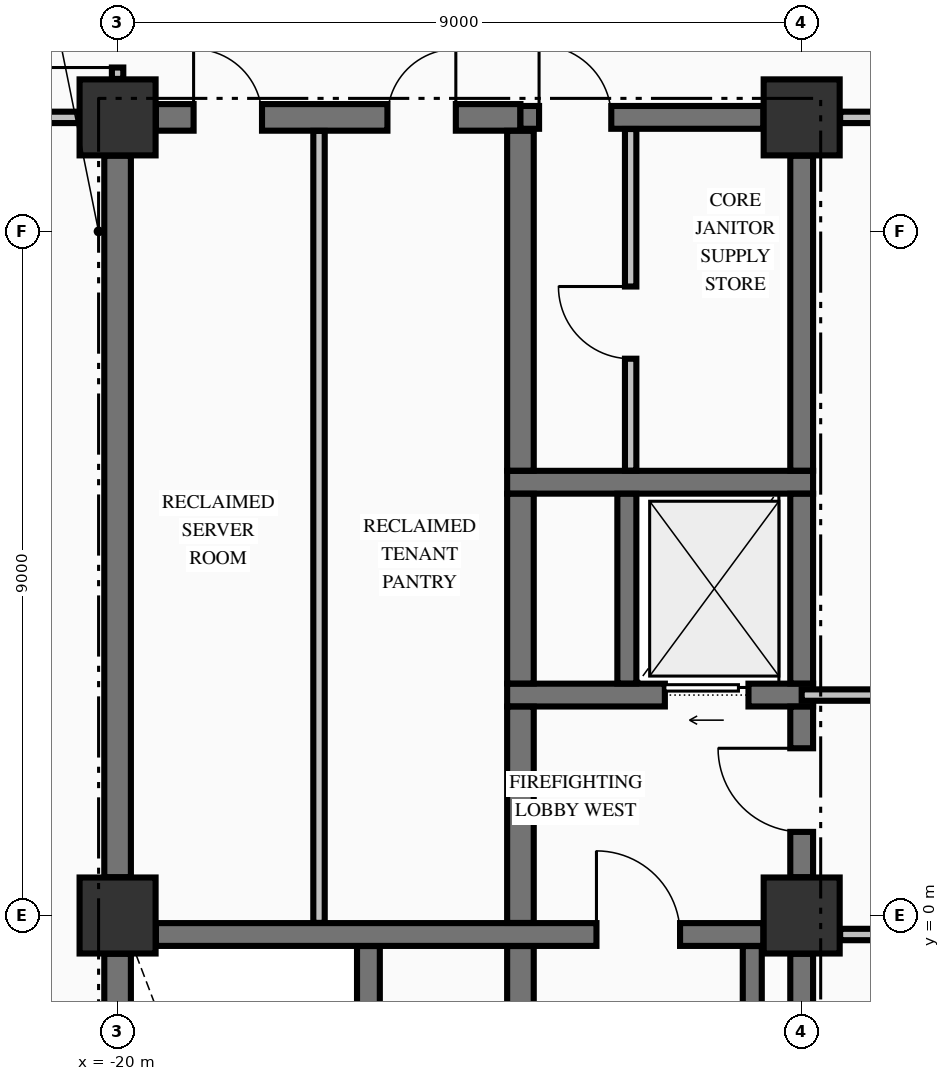
"""IFC4 building model, lengths in metres.
Left out: names, types, materials, properties, quantities, classifications, styles, units other than length and angle.
Written with IfcOpenShell. Run it as: python <this file> out.ifc"""

import sys

from ifc_helpers import new_model, si_unit, direction, frame, frame_2d, origin, origin_2d, place, context, subcontext, project, spatial, rectangle, extrude, element, fill, save


model = new_model("IFC4")
c1 = context("Model", 3, precision=1e-05, world=origin(), true_north=direction((0.0, 1.0)))
c2 = subcontext(c1, "Body", "Model", "MODEL_VIEW")
j1 = project(units=[si_unit("LENGTHUNIT", "METRE"), si_unit("PLANEANGLEUNIT", "RADIAN")], contexts=[c1])
p1 = place(None, origin())
s1 = spatial("IfcSite", under=j1, at=p1, CompositionType="ELEMENT")
p2 = place(p1, origin())
s2 = spatial("IfcBuilding", under=s1, at=p2, CompositionType="ELEMENT")
p3 = place(p2, frame((0.0, 0.0, 139.2)))
s3 = spatial("IfcBuildingStorey", under=s2, at=p3, CompositionType="ELEMENT", Elevation=139.2)
for number, where, z_axis, x_axis in (
    (1, (-20.0, 10.5, -0.25), (0.0, 0.0, 1.0), (1.0, 0.0, 0.0)),
    (2, (-11.0, 0.0, -0.25), (0.0, 0.0, 1.0), (1.0, 0.0, 0.0)),
    (3, (-11.0, 10.5, -0.25), (0.0, 0.0, 1.0), (1.0, 0.0, 0.0)),
    (4, (-20.0, 0.0, -0.25), (0.0, 0.0, 1.0), (1.0, 0.0, 0.0)),
):
    element("IfcColumn", number, at=place(p3, frame(where, z_axis=z_axis, x_axis=x_axis)), inside=s3, PredefinedType="COLUMN", context=c2, shape_type="SweptSolid", body=[
        extrude(rectangle(XDim=1.0, YDim=1.0, at=origin_2d()), origin(), (0.0, 0.0, 1.0), 3.495),
    ])
p4 = place(p3, frame((-19.496, -0.25, 0.0), z_axis=(0.0, 0.0, 1.0), x_axis=(1.0, 0.0, 0.0)))
e5 = element("IfcWall", 5, at=p4, inside=s3, PredefinedType="SHEAR", context=c2, shape_type="SweptSolid", body=[
    extrude(rectangle(XDim=7.992, YDim=0.3, at=frame_2d((3.996, 0.0))), origin(), (0.0, 0.0, 1.0), 3.245),
])
p5 = place(p4, frame((5.796, 0.0, 0.0)))
e6 = element("IfcOpeningElement", 6, at=p5, cuts=e5, PredefinedType="OPENING", context=c2, shape_type="SweptSolid", body=[
    extrude(rectangle(XDim=1.1, YDim=2.15, at=frame_2d((0.55, 1.075))), frame((0.0, 0.16, 0.0), z_axis=(0.0, -1.0, 0.0), x_axis=(1.0, 0.0, 0.0)), (0.0, 0.0, 1.0), 0.32),
])
p6 = place(p3, frame((-14.875, 2.9, 0.0), z_axis=(0.0, 0.0, 1.0), x_axis=(1.0, 0.0, 0.0)))
e7 = element("IfcWall", 7, at=p6, inside=s3, PredefinedType="SHEAR", context=c2, shape_type="SweptSolid", body=[
    extrude(rectangle(XDim=4.025, YDim=0.3, at=frame_2d((2.012, 0.0))), origin(), (0.0, 0.0, 1.0), 3.245),
])
p7 = place(p6, frame((2.075, 0.0, 0.0)))
e8 = element("IfcOpeningElement", 8, at=p7, cuts=e7, PredefinedType="OPENING", context=c2, shape_type="SweptSolid", body=[
    extrude(rectangle(XDim=1.1, YDim=2.2, at=frame_2d((0.55, 1.1))), frame((0.0, 0.16, 0.0), z_axis=(0.0, -1.0, 0.0), x_axis=(1.0, 0.0, 0.0)), (0.0, 0.0, 1.0), 0.32),
])
p8 = place(p3, frame((-14.875, 5.7, 0.0), z_axis=(0.0, 0.0, 1.0), x_axis=(1.0, 0.0, 0.0)))
e9 = element("IfcWall", 9, at=p8, inside=s3, PredefinedType="SHEAR", context=c2, shape_type="SweptSolid", body=[
    extrude(rectangle(XDim=4.025, YDim=0.3, at=frame_2d((2.012, 0.0))), origin(), (0.0, 0.0, 1.0), 3.245),
])
p9 = place(p3, frame((-19.496, 10.5, 0.0), z_axis=(0.0, 0.0, 1.0), x_axis=(1.0, 0.0, 0.0)))
e10 = element("IfcWall", 10, at=p9, inside=s3, PredefinedType="SHEAR", context=c2, shape_type="SweptSolid", body=[
    extrude(rectangle(XDim=4.796, YDim=0.35, at=frame_2d((2.398, 0.0))), origin(), (0.0, 0.0, 1.0), 3.245),
])
p10 = place(p9, frame((0.496, 0.0, 0.0)))
e11 = element("IfcOpeningElement", 11, at=p10, cuts=e10, PredefinedType="OPENING", context=c2, shape_type="SweptSolid", body=[
    extrude(rectangle(XDim=0.9, YDim=2.15, at=frame_2d((0.45, 1.075))), frame((0.0, 0.185, 0.0), z_axis=(0.0, -1.0, 0.0), x_axis=(1.0, 0.0, 0.0)), (0.0, 0.0, 1.0), 0.37),
])
p11 = place(p9, frame((3.046, 0.0, 0.0)))
e12 = element("IfcOpeningElement", 12, at=p11, cuts=e10, PredefinedType="OPENING", context=c2, shape_type="SweptSolid", body=[
    extrude(rectangle(XDim=0.9, YDim=2.15, at=frame_2d((0.45, 1.075))), frame((0.0, 0.185, 0.0), z_axis=(0.0, -1.0, 0.0), x_axis=(1.0, 0.0, 0.0)), (0.0, 0.0, 1.0), 0.37),
])
p12 = place(p3, frame((-14.7, 10.5, 0.0), z_axis=(0.0, 0.0, 1.0), x_axis=(1.0, 0.0, 0.0)))
e13 = element("IfcWall", 13, at=p12, inside=s3, PredefinedType="SHEAR", context=c2, shape_type="SweptSolid", body=[
    extrude(rectangle(XDim=3.196, YDim=0.3, at=frame_2d((1.598, 0.0))), origin(), (0.0, 0.0, 1.0), 3.245),
])
p13 = place(p12, frame((0.245, 0.0, 0.0)))
e14 = element("IfcOpeningElement", 14, at=p13, cuts=e13, PredefinedType="OPENING", context=c2, shape_type="SweptSolid", body=[
    extrude(rectangle(XDim=0.95, YDim=2.15, at=frame_2d((0.475, 1.075))), frame((0.0, 0.16, 0.0), z_axis=(0.0, -1.0, 0.0), x_axis=(1.0, 0.0, 0.0)), (0.0, 0.0, 1.0), 0.32),
])
p14 = place(p3, frame((-10.494, -0.25, 0.0), z_axis=(0.0, 0.0, 1.0), x_axis=(1.0, 0.0, 0.0)))
e15 = element("IfcWall", 15, at=p14, inside=s3, PredefinedType="PARTITIONING", context=c2, shape_type="SweptSolid", body=[
    extrude(rectangle(XDim=20.988, YDim=0.15, at=frame_2d((10.494, 0.0))), origin(), (0.0, 0.0, 1.0), 3.245),
])
p15 = place(p14, frame((12.594, 0.0, 0.0)))
e16 = element("IfcOpeningElement", 16, at=p15, cuts=e15, PredefinedType="OPENING", context=c2, shape_type="SweptSolid", body=[
    extrude(rectangle(XDim=1.1, YDim=2.15, at=frame_2d((0.55, 1.075))), frame((0.0, 0.085, 0.0), z_axis=(0.0, -1.0, 0.0), x_axis=(1.0, 0.0, 0.0)), (0.0, 0.0, 1.0), 0.17),
])
p16 = place(p14, frame((5.249, 0.0, 0.0)))
e17 = element("IfcOpeningElement", 17, at=p16, cuts=e15, PredefinedType="OPENING", context=c2, shape_type="SweptSolid", body=[
    extrude(rectangle(XDim=1.05, YDim=2.15, at=frame_2d((0.525, 1.075))), frame((0.0, 0.085, 0.0), z_axis=(0.0, -1.0, 0.0), x_axis=(1.0, 0.0, 0.0)), (0.0, 0.0, 1.0), 0.17),
])
p17 = place(p14, frame((17.399, 0.0, 0.0)))
e18 = element("IfcOpeningElement", 18, at=p17, cuts=e15, PredefinedType="OPENING", context=c2, shape_type="SweptSolid", body=[
    extrude(rectangle(XDim=0.95, YDim=2.15, at=frame_2d((0.475, 1.075))), frame((0.0, 0.085, 0.0), z_axis=(0.0, -1.0, 0.0), x_axis=(1.0, 0.0, 0.0)), (0.0, 0.0, 1.0), 0.17),
])
p18 = place(p3, frame((-11.0, 2.9, 0.0), z_axis=(0.0, 0.0, 1.0), x_axis=(1.0, 0.0, 0.0)))
e19 = element("IfcWall", 19, at=p18, inside=s3, PredefinedType="PARTITIONING", context=c2, shape_type="SweptSolid", body=[
    extrude(rectangle(XDim=22.0, YDim=0.15, at=frame_2d((11.0, 0.0))), origin(), (0.0, 0.0, 1.0), 3.245),
])
p19 = place(p18, frame((13.1, 0.0, 0.0)))
e20 = element("IfcOpeningElement", 20, at=p19, cuts=e19, PredefinedType="OPENING", context=c2, shape_type="SweptSolid", body=[
    extrude(rectangle(XDim=1.1, YDim=2.15, at=frame_2d((0.55, 1.075))), frame((0.0, 0.085, 0.0), z_axis=(0.0, -1.0, 0.0), x_axis=(1.0, 0.0, 0.0)), (0.0, 0.0, 1.0), 0.17),
])
p20 = place(p18, frame((5.755, 0.0, 0.0)))
e21 = element("IfcOpeningElement", 21, at=p20, cuts=e19, PredefinedType="OPENING", context=c2, shape_type="SweptSolid", body=[
    extrude(rectangle(XDim=1.05, YDim=2.15, at=frame_2d((0.525, 1.075))), frame((0.0, 0.085, 0.0), z_axis=(0.0, -1.0, 0.0), x_axis=(1.0, 0.0, 0.0)), (0.0, 0.0, 1.0), 0.17),
])
p21 = place(p18, frame((15.755, 0.0, 0.0)))
e22 = element("IfcOpeningElement", 22, at=p21, cuts=e19, PredefinedType="OPENING", context=c2, shape_type="SweptSolid", body=[
    extrude(rectangle(XDim=0.95, YDim=2.15, at=frame_2d((0.475, 1.075))), frame((0.0, 0.085, 0.0), z_axis=(0.0, -1.0, 0.0), x_axis=(1.0, 0.0, 0.0)), (0.0, 0.0, 1.0), 0.17),
])
p22 = place(p18, frame((19.385, 0.0, 0.0)))
e23 = element("IfcOpeningElement", 23, at=p22, cuts=e19, PredefinedType="OPENING", context=c2, shape_type="SweptSolid", body=[
    extrude(rectangle(XDim=0.95, YDim=2.15, at=frame_2d((0.475, 1.075))), frame((0.0, 0.085, 0.0), z_axis=(0.0, -1.0, 0.0), x_axis=(1.0, 0.0, 0.0)), (0.0, 0.0, 1.0), 0.17),
])
p23 = place(p3, frame((-27.835, 10.5, 0.0), z_axis=(0.0, 0.0, 1.0), x_axis=(1.0, 0.0, 0.0)))
e24 = element("IfcWall", 24, at=p23, inside=s3, PredefinedType="PARTITIONING", context=c2, shape_type="SweptSolid", body=[
    extrude(rectangle(XDim=7.329, YDim=0.15, at=frame_2d((3.665, 0.0))), origin(), (0.0, 0.0, 1.0), 3.245),
])
p24 = place(p23, frame((3.335, 0.0, 0.0)))
e25 = element("IfcOpeningElement", 25, at=p24, cuts=e24, PredefinedType="OPENING", context=c2, shape_type="SweptSolid", body=[
    extrude(rectangle(XDim=1.0, YDim=2.15, at=frame_2d((0.5, 1.075))), frame((0.0, 0.085, 0.0), z_axis=(0.0, -1.0, 0.0), x_axis=(1.0, 0.0, 0.0)), (0.0, 0.0, 1.0), 0.17),
])
p25 = place(p3, frame((-10.494, 10.5, 0.0), z_axis=(0.0, 0.0, 1.0), x_axis=(1.0, 0.0, 0.0)))
e26 = element("IfcWall", 26, at=p25, inside=s3, PredefinedType="PARTITIONING", context=c2, shape_type="SweptSolid", body=[
    extrude(rectangle(XDim=20.988, YDim=0.15, at=frame_2d((10.494, 0.0))), origin(), (0.0, 0.0, 1.0), 3.245),
])
p26 = place(p25, frame((12.594, 0.0, 0.0)))
e27 = element("IfcOpeningElement", 27, at=p26, cuts=e26, PredefinedType="OPENING", context=c2, shape_type="SweptSolid", body=[
    extrude(rectangle(XDim=1.1, YDim=2.15, at=frame_2d((0.55, 1.075))), frame((0.0, 0.085, 0.0), z_axis=(0.0, -1.0, 0.0), x_axis=(1.0, 0.0, 0.0)), (0.0, 0.0, 1.0), 0.17),
])
p27 = place(p3, frame((-20.0, -9.446, 0.0), z_axis=(0.0, 0.0, 1.0), x_axis=(0.0, 1.0, 0.0)))
e28 = element("IfcWall", 28, at=p27, inside=s3, PredefinedType="SHEAR", context=c2, shape_type="SweptSolid", body=[
    extrude(rectangle(XDim=8.942, YDim=0.35, at=frame_2d((4.471, 0.0))), origin(), (0.0, 0.0, 1.0), 3.245),
])
p28 = place(p3, frame((-20.0, 0.504, 0.0), z_axis=(0.0, 0.0, 1.0), x_axis=(0.0, 1.0, 0.0)))
e29 = element("IfcWall", 29, at=p28, inside=s3, PredefinedType="SHEAR", context=c2, shape_type="SweptSolid", body=[
    extrude(rectangle(XDim=9.492, YDim=0.35, at=frame_2d((4.746, 0.0))), origin(), (0.0, 0.0, 1.0), 3.245),
])
p29 = place(p3, frame((-16.7, -9.773, 0.0), z_axis=(0.0, 0.0, 1.0), x_axis=(0.0, 1.0, 0.0)))
e30 = element("IfcWall", 30, at=p29, inside=s3, PredefinedType="SHEAR", context=c2, shape_type="SweptSolid", body=[
    extrude(rectangle(XDim=9.371, YDim=0.3, at=frame_2d((4.686, 0.0))), origin(), (0.0, 0.0, 1.0), 3.245),
])
p30 = place(p3, frame((-14.7, -9.773, 0.0), z_axis=(0.0, 0.0, 1.0), x_axis=(0.0, 1.0, 0.0)))
e31 = element("IfcWall", 31, at=p30, inside=s3, PredefinedType="SHEAR", context=c2, shape_type="SweptSolid", body=[
    extrude(rectangle(XDim=9.371, YDim=0.35, at=frame_2d((4.686, 0.0))), origin(), (0.0, 0.0, 1.0), 3.245),
])
p31 = place(p3, frame((-14.7, -0.098, 0.0), z_axis=(0.0, 0.0, 1.0), x_axis=(0.0, 1.0, 0.0)))
e32 = element("IfcWall", 32, at=p31, inside=s3, PredefinedType="SHEAR", context=c2, shape_type="SweptSolid", body=[
    extrude(rectangle(XDim=2.846, YDim=0.35, at=frame_2d((1.423, 0.0))), origin(), (0.0, 0.0, 1.0), 3.245),
])
p32 = place(p3, frame((-14.7, 3.052, 0.0), z_axis=(0.0, 0.0, 1.0), x_axis=(0.0, 1.0, 0.0)))
e33 = element("IfcWall", 33, at=p32, inside=s3, PredefinedType="SHEAR", context=c2, shape_type="SweptSolid", body=[
    extrude(rectangle(XDim=2.496, YDim=0.35, at=frame_2d((1.248, 0.0))), origin(), (0.0, 0.0, 1.0), 3.245),
])
p33 = place(p3, frame((-14.7, 5.852, 0.0), z_axis=(0.0, 0.0, 1.0), x_axis=(0.0, 1.0, 0.0)))
e34 = element("IfcWall", 34, at=p33, inside=s3, PredefinedType="SHEAR", context=c2, shape_type="SweptSolid", body=[
    extrude(rectangle(XDim=4.471, YDim=0.35, at=frame_2d((2.235, 0.0))), origin(), (0.0, 0.0, 1.0), 3.245),
])
p34 = place(p3, frame((-13.3, 3.052, 0.0), z_axis=(0.0, 0.0, 1.0), x_axis=(0.0, 1.0, 0.0)))
e35 = element("IfcWall", 35, at=p34, inside=s3, PredefinedType="SOLIDWALL", context=c2, shape_type="SweptSolid", body=[
    extrude(rectangle(XDim=2.496, YDim=0.25, at=frame_2d((1.248, 0.0))), origin(), (0.0, 0.0, 1.0), 3.245),
])
p35 = place(p3, frame((-11.65, -9.798, 0.0), z_axis=(0.0, 0.0, 1.0), x_axis=(0.0, 1.0, 0.0)))
e36 = element("IfcWall", 36, at=p35, inside=s3, PredefinedType="SOLIDWALL", context=c2, shape_type="SweptSolid", body=[
    extrude(rectangle(XDim=9.396, YDim=0.25, at=frame_2d((4.698, 0.0))), origin(), (0.0, 0.0, 1.0), 3.245),
])
p36 = place(p3, frame((-11.0, -9.446, 0.0), z_axis=(0.0, 0.0, 1.0), x_axis=(0.0, 1.0, 0.0)))
e37 = element("IfcWall", 37, at=p36, inside=s3, PredefinedType="SHEAR", context=c2, shape_type="SweptSolid", body=[
    extrude(rectangle(XDim=8.942, YDim=0.3, at=frame_2d((4.471, 0.0))), origin(), (0.0, 0.0, 1.0), 3.245),
])
p37 = place(p3, frame((-11.0, 0.504, 0.0), z_axis=(0.0, 0.0, 1.0), x_axis=(0.0, 1.0, 0.0)))
e38 = element("IfcWall", 38, at=p37, inside=s3, PredefinedType="SHEAR", context=c2, shape_type="SweptSolid", body=[
    extrude(rectangle(XDim=2.244, YDim=0.3, at=frame_2d((1.122, 0.0))), origin(), (0.0, 0.0, 1.0), 3.245),
])
p38 = place(p37, frame((0.596, 0.0, 0.0)))
e39 = element("IfcOpeningElement", 39, at=p38, cuts=e38, PredefinedType="OPENING", context=c2, shape_type="SweptSolid", body=[
    extrude(rectangle(XDim=1.1, YDim=2.15, at=frame_2d((0.55, 1.075))), frame((0.0, 0.16, 0.0), z_axis=(0.0, -1.0, 0.0), x_axis=(1.0, 0.0, 0.0)), (0.0, 0.0, 1.0), 0.32),
])
p39 = place(p3, frame((-11.0, 3.052, 0.0), z_axis=(0.0, 0.0, 1.0), x_axis=(0.0, 1.0, 0.0)))
e40 = element("IfcWall", 40, at=p39, inside=s3, PredefinedType="SHEAR", context=c2, shape_type="SweptSolid", body=[
    extrude(rectangle(XDim=2.496, YDim=0.3, at=frame_2d((1.248, 0.0))), origin(), (0.0, 0.0, 1.0), 3.245),
])
p40 = place(p3, frame((-11.0, 5.852, 0.0), z_axis=(0.0, 0.0, 1.0), x_axis=(0.0, 1.0, 0.0)))
e41 = element("IfcWall", 41, at=p40, inside=s3, PredefinedType="SHEAR", context=c2, shape_type="SweptSolid", body=[
    extrude(rectangle(XDim=4.144, YDim=0.3, at=frame_2d((2.072, 0.0))), origin(), (0.0, 0.0, 1.0), 3.245),
])
p41 = place(p3, frame((-20.0, 11.006, 0.0), z_axis=(0.0, 0.0, 1.0), x_axis=(0.0, 1.0, 0.0)))
e42 = element("IfcWall", 42, at=p41, inside=s3, PredefinedType="PARTITIONING", context=c2, shape_type="SweptSolid", body=[
    extrude(rectangle(XDim=1.666, YDim=0.15, at=frame_2d((0.833, 0.0))), origin(), (0.0, 0.0, 1.0), 2.735),
])
p42 = place(p41, frame((0.15, 0.0, 0.0)))
e43 = element("IfcOpeningElement", 43, at=p42, cuts=e42, PredefinedType="OPENING", context=c2, shape_type="SweptSolid", body=[
    extrude(rectangle(XDim=0.95, YDim=2.15, at=frame_2d((0.475, 1.075))), frame((0.0, 0.085, 0.0), z_axis=(0.0, -1.0, 0.0), x_axis=(1.0, 0.0, 0.0)), (0.0, 0.0, 1.0), 0.17),
])
p43 = place(p3, frame((-17.35, -0.097, 0.0), z_axis=(0.0, 0.0, 1.0), x_axis=(0.0, 1.0, 0.0)))
e44 = element("IfcWall", 44, at=p43, inside=s3, PredefinedType="PARTITIONING", context=c2, shape_type="SweptSolid", body=[
    extrude(rectangle(XDim=10.419, YDim=0.15, at=frame_2d((5.209, 0.0))), origin(), (0.0, 0.0, 1.0), 3.245),
])
p44 = place(p3, frame((-13.25, 5.853, 0.0), z_axis=(0.0, 0.0, 1.0), x_axis=(0.0, 1.0, 0.0)))
e45 = element("IfcWall", 45, at=p44, inside=s3, PredefinedType="PARTITIONING", context=c2, shape_type="SweptSolid", body=[
    extrude(rectangle(XDim=4.494, YDim=0.15, at=frame_2d((2.247, 0.0))), origin(), (0.0, 0.0, 1.0), 3.245),
])
p45 = place(p44, frame((1.472, 0.0, 0.0)))
e46 = element("IfcOpeningElement", 46, at=p45, cuts=e45, PredefinedType="OPENING", context=c2, shape_type="SweptSolid", body=[
    extrude(rectangle(XDim=0.95, YDim=2.15, at=frame_2d((0.475, 1.075))), frame((0.0, 0.085, 0.0), z_axis=(0.0, -1.0, 0.0), x_axis=(1.0, 0.0, 0.0)), (0.0, 0.0, 1.0), 0.17),
])
p46 = place(p5, origin())
e47 = element("IfcDoor", 47, at=p46, inside=s3, OperationType="SINGLE_SWING_LEFT", PredefinedType="DOOR", context=c2, shape_type="SweptSolid", body=[
    extrude(rectangle(XDim=1.1, YDim=2.15, at=frame_2d((0.55, 1.075))), frame((0.0, 0.025, 0.0), z_axis=(0.0, -1.0, 0.0), x_axis=(1.0, 0.0, 0.0)), (0.0, 0.0, 1.0), 0.05),
])
fill(e6, e47)
p47 = place(p38, origin())
e48 = element("IfcDoor", 48, at=p47, inside=s3, OperationType="SINGLE_SWING_RIGHT", PredefinedType="DOOR", context=c2, shape_type="SweptSolid", body=[
    extrude(rectangle(XDim=1.1, YDim=2.15, at=frame_2d((0.55, 1.075))), frame((0.0, 0.025, 0.0), z_axis=(0.0, -1.0, 0.0), x_axis=(1.0, 0.0, 0.0)), (0.0, 0.0, 1.0), 0.05),
])
fill(e39, e48)
p48 = place(p7, origin())
e49 = element("IfcDoor", 49, at=p48, inside=s3, OperationType="SLIDING_TO_LEFT", PredefinedType="DOOR", context=c2, shape_type="SweptSolid", body=[
    extrude(rectangle(XDim=1.1, YDim=2.2, at=frame_2d((0.55, 1.1))), frame((0.0, 0.025, 0.0), z_axis=(0.0, -1.0, 0.0), x_axis=(1.0, 0.0, 0.0)), (0.0, 0.0, 1.0), 0.05),
])
fill(e8, e49)
p49 = place(p13, origin())
e50 = element("IfcDoor", 50, at=p49, inside=s3, OperationType="SINGLE_SWING_LEFT", PredefinedType="DOOR", context=c2, shape_type="SweptSolid", body=[
    extrude(rectangle(XDim=0.95, YDim=2.15, at=frame_2d((0.475, 1.075))), frame((0.0, 0.025, 0.0), z_axis=(0.0, -1.0, 0.0), x_axis=(1.0, 0.0, 0.0)), (0.0, 0.0, 1.0), 0.05),
])
fill(e14, e50)
p50 = place(p45, origin())
e51 = element("IfcDoor", 51, at=p50, inside=s3, OperationType="SINGLE_SWING_RIGHT", PredefinedType="DOOR", context=c2, shape_type="SweptSolid", body=[
    extrude(rectangle(XDim=0.95, YDim=2.15, at=frame_2d((0.475, 1.075))), frame((0.0, 0.025, 0.0), z_axis=(0.0, -1.0, 0.0), x_axis=(1.0, 0.0, 0.0)), (0.0, 0.0, 1.0), 0.05),
])
fill(e46, e51)
p51 = place(p10, origin())
e52 = element("IfcDoor", 52, at=p51, inside=s3, OperationType="SINGLE_SWING_LEFT", PredefinedType="DOOR", context=c2, shape_type="SweptSolid", body=[
    extrude(rectangle(XDim=0.9, YDim=2.15, at=frame_2d((0.45, 1.075))), frame((0.0, 0.025, 0.0), z_axis=(0.0, -1.0, 0.0), x_axis=(1.0, 0.0, 0.0)), (0.0, 0.0, 1.0), 0.05),
])
fill(e11, e52)
p52 = place(p11, origin())
e53 = element("IfcDoor", 53, at=p52, inside=s3, OperationType="SINGLE_SWING_RIGHT", PredefinedType="DOOR", context=c2, shape_type="SweptSolid", body=[
    extrude(rectangle(XDim=0.9, YDim=2.15, at=frame_2d((0.45, 1.075))), frame((0.0, 0.025, 0.0), z_axis=(0.0, -1.0, 0.0), x_axis=(1.0, 0.0, 0.0)), (0.0, 0.0, 1.0), 0.05),
])
fill(e12, e53)
p53 = place(p42, origin())
e54 = element("IfcDoor", 54, at=p53, inside=s3, OperationType="SINGLE_SWING_LEFT", PredefinedType="DOOR", context=c2, shape_type="SweptSolid", body=[
    extrude(rectangle(XDim=0.95, YDim=2.15, at=frame_2d((0.475, 1.075))), frame((0.0, 0.025, 0.0), z_axis=(0.0, -1.0, 0.0), x_axis=(1.0, 0.0, 0.0)), (0.0, 0.0, 1.0), 0.05),
])
fill(e43, e54)
save(model, sys.argv[1])
